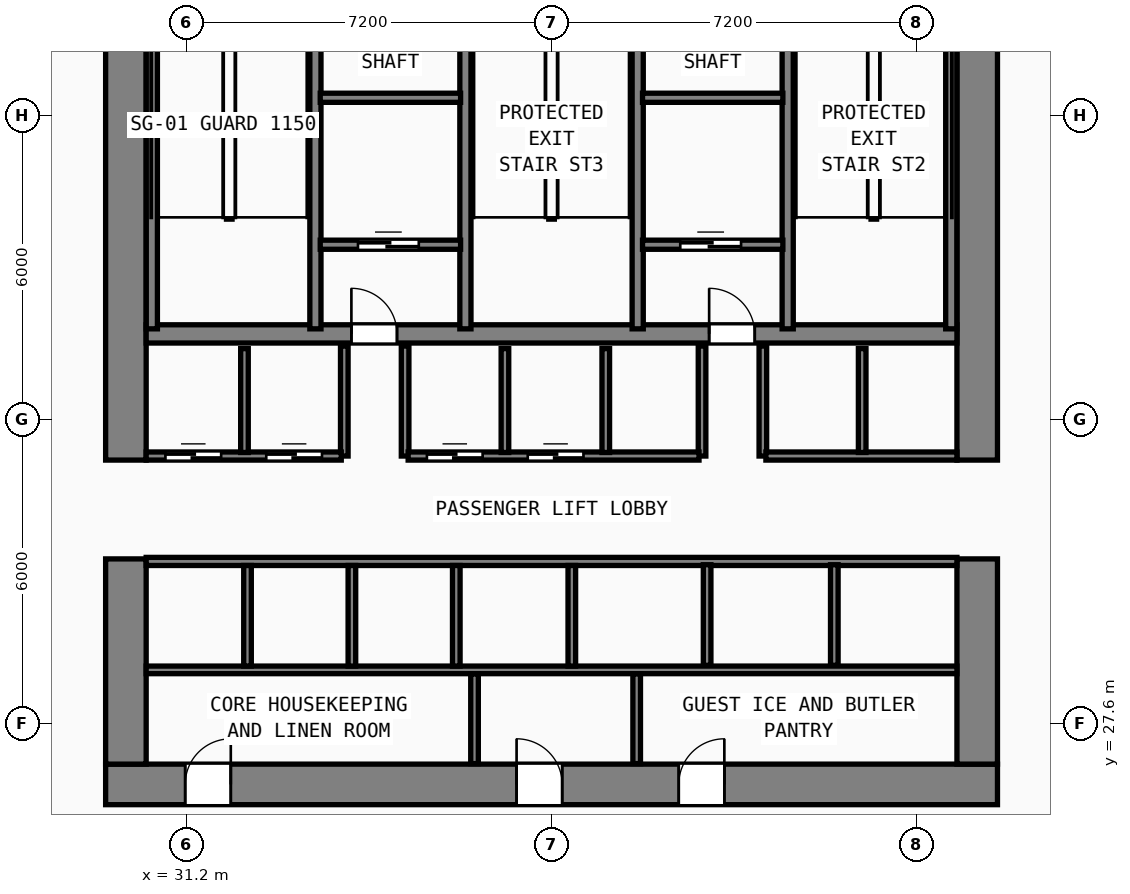
"""IFC4 building model, lengths in metres.
Left out: names, types, materials, properties, quantities, classifications, styles, units other than length and angle.
Written with IfcOpenShell. Run it as: python <this file> out.ifc"""

import sys

from ifc_helpers import new_model, si_unit, direction, frame, frame_2d, origin, place, context, subcontext, project, spatial, rectangle, extrude, element, fill, save


model = new_model("IFC4")
c1 = context("Model", 3, precision=1e-05, world=origin(), true_north=direction((0.0, 1.0)))
c2 = subcontext(c1, "Body", "Model", "MODEL_VIEW")
j1 = project(units=[si_unit("LENGTHUNIT", "METRE"), si_unit("PLANEANGLEUNIT", "RADIAN")], contexts=[c1])
p1 = place(None, origin())
s1 = spatial("IfcSite", under=j1, at=p1, CompositionType="ELEMENT")
p2 = place(p1, origin())
s2 = spatial("IfcBuilding", under=s1, at=p2, CompositionType="ELEMENT")
p3 = place(p2, frame((0.0, 0.0, 5.4)))
s3 = spatial("IfcBuildingStorey", under=s2, at=p3, CompositionType="ELEMENT", Elevation=5.4)
p4 = place(p3, frame((29.6, 26.4, 0.0), z_axis=(0.0, 0.0, 1.0), x_axis=(1.0, 0.0, 0.0)))
e1 = element("IfcWall", 1, at=p4, inside=s3, PredefinedType="SHEAR", context=c2, shape_type="SweptSolid", body=[
    extrude(rectangle(XDim=17.6, YDim=0.8, at=frame_2d((8.8, 0.0))), origin(), (0.0, 0.0, 1.0), 4.56),
])
p5 = place(p4, frame((2.47, 0.0, 0.0), z_axis=(0.0, 0.0, 1.0), x_axis=(-1.0, 0.0, 0.0)))
e2 = element("IfcOpeningElement", 2, at=p5, cuts=e1, PredefinedType="OPENING", context=c2, shape_type="SweptSolid", body=[
    extrude(rectangle(XDim=0.9, YDim=2.1, at=frame_2d((0.45, 1.05))), frame((0.0, 0.41, 0.0), z_axis=(0.0, -1.0, 0.0), x_axis=(1.0, 0.0, 0.0)), (0.0, 0.0, 1.0), 0.82),
])
p6 = place(p4, frame((9.01, 0.0, 0.0), z_axis=(0.0, 0.0, 1.0), x_axis=(-1.0, 0.0, 0.0)))
e3 = element("IfcOpeningElement", 3, at=p6, cuts=e1, PredefinedType="OPENING", context=c2, shape_type="SweptSolid", body=[
    extrude(rectangle(XDim=0.9, YDim=2.1, at=frame_2d((0.45, 1.05))), frame((0.0, 0.41, 0.0), z_axis=(0.0, -1.0, 0.0), x_axis=(1.0, 0.0, 0.0)), (0.0, 0.0, 1.0), 0.82),
])
p7 = place(p4, frame((12.21, 0.0, 0.0), z_axis=(0.0, 0.0, 1.0), x_axis=(-1.0, 0.0, 0.0)))
e4 = element("IfcOpeningElement", 4, at=p7, cuts=e1, PredefinedType="OPENING", context=c2, shape_type="SweptSolid", body=[
    extrude(rectangle(XDim=0.9, YDim=2.1, at=frame_2d((0.45, 1.05))), frame((0.0, 0.41, 0.0), z_axis=(0.0, -1.0, 0.0), x_axis=(1.0, 0.0, 0.0)), (0.0, 0.0, 1.0), 0.82),
])
p8 = place(p3, frame((30.0, 26.8, 0.0), z_axis=(0.0, 0.0, 1.0), x_axis=(0.0, 1.0, 0.0)))
e5 = element("IfcWall", 5, at=p8, inside=s3, PredefinedType="SHEAR", context=c2, shape_type="SweptSolid", body=[
    extrude(rectangle(XDim=4.05, YDim=0.8, at=frame_2d((2.025, 0.0))), origin(), (0.0, 0.0, 1.0), 4.56),
])
p9 = place(p3, frame((30.0, 32.8, 0.0), z_axis=(0.0, 0.0, 1.0), x_axis=(0.0, 1.0, 0.0)))
e6 = element("IfcWall", 6, at=p9, inside=s3, PredefinedType="SHEAR", context=c2, shape_type="SweptSolid", body=[
    extrude(rectangle(XDim=10.0, YDim=0.8, at=frame_2d((5.0, 0.0))), origin(), (0.0, 0.0, 1.0), 4.56),
])
p10 = place(p3, frame((46.8, 26.8, 0.0), z_axis=(0.0, 0.0, 1.0), x_axis=(0.0, 1.0, 0.0)))
e7 = element("IfcWall", 7, at=p10, inside=s3, PredefinedType="SHEAR", context=c2, shape_type="SweptSolid", body=[
    extrude(rectangle(XDim=4.05, YDim=0.8, at=frame_2d((2.025, 0.0))), origin(), (0.0, 0.0, 1.0), 4.56),
])
p11 = place(p3, frame((46.8, 32.8, 0.0), z_axis=(0.0, 0.0, 1.0), x_axis=(0.0, 1.0, 0.0)))
e8 = element("IfcWall", 8, at=p11, inside=s3, PredefinedType="SHEAR", context=c2, shape_type="SweptSolid", body=[
    extrude(rectangle(XDim=10.0, YDim=0.8, at=frame_2d((5.0, 0.0))), origin(), (0.0, 0.0, 1.0), 4.56),
])
p12 = place(p3, frame((30.4, 35.29, 0.0), z_axis=(0.0, 0.0, 1.0), x_axis=(1.0, 0.0, 0.0)))
e9 = element("IfcWall", 9, at=p12, inside=s3, PredefinedType="SHEAR", context=c2, shape_type="SweptSolid", body=[
    extrude(rectangle(XDim=16.0, YDim=0.36, at=frame_2d((8.0, 0.0))), origin(), (0.0, 0.0, 1.0), 4.56),
])
p13 = place(p12, frame((4.95, 0.0, 0.0), z_axis=(0.0, 0.0, 1.0), x_axis=(-1.0, 0.0, 0.0)))
e10 = element("IfcOpeningElement", 10, at=p13, cuts=e9, PredefinedType="OPENING", context=c2, shape_type="SweptSolid", body=[
    extrude(rectangle(XDim=0.9, YDim=2.1, at=frame_2d((0.45, 1.05))), frame((0.0, 0.19, 0.0), z_axis=(0.0, -1.0, 0.0), x_axis=(1.0, 0.0, 0.0)), (0.0, 0.0, 1.0), 0.38),
])
p14 = place(p12, frame((12.01, 0.0, 0.0), z_axis=(0.0, 0.0, 1.0), x_axis=(-1.0, 0.0, 0.0)))
e11 = element("IfcOpeningElement", 11, at=p14, cuts=e9, PredefinedType="OPENING", context=c2, shape_type="SweptSolid", body=[
    extrude(rectangle(XDim=0.9, YDim=2.1, at=frame_2d((0.45, 1.05))), frame((0.0, 0.19, 0.0), z_axis=(0.0, -1.0, 0.0), x_axis=(1.0, 0.0, 0.0)), (0.0, 0.0, 1.0), 0.38),
])
for number, where, z_axis, x_axis in (
    (12, (30.512, 35.39, 0.0), (0.0, 0.0, 1.0), (0.0, 1.0, 0.0)),
    (13, (33.74, 35.39, 0.0), (0.0, 0.0, 1.0), (0.0, 1.0, 0.0)),
    (14, (36.7, 35.39, 0.0), (0.0, 0.0, 1.0), (0.0, 1.0, 0.0)),
    (15, (40.1, 35.39, 0.0), (0.0, 0.0, 1.0), (0.0, 1.0, 0.0)),
    (16, (43.06, 35.39, 0.0), (0.0, 0.0, 1.0), (0.0, 1.0, 0.0)),
    (17, (46.288, 35.39, 0.0), (0.0, 0.0, 1.0), (0.0, 1.0, 0.0)),
):
    element("IfcWall", number, at=place(p3, frame(where, z_axis=z_axis, x_axis=x_axis)), inside=s3, PredefinedType="SHEAR", context=c2, shape_type="SweptSolid", body=[
        extrude(rectangle(XDim=7.41, YDim=0.22, at=frame_2d((3.705, 0.0))), origin(), (0.0, 0.0, 1.0), 4.56),
    ])
for number, where, z_axis, x_axis in (
    (18, (33.835, 39.95, 0.0), (0.0, 0.0, 1.0), (1.0, 0.0, 0.0)),
    (19, (40.195, 39.95, 0.0), (0.0, 0.0, 1.0), (1.0, 0.0, 0.0)),
):
    element("IfcWall", number, at=place(p3, frame(where, z_axis=z_axis, x_axis=x_axis)), inside=s3, PredefinedType="SOLIDWALL", context=c2, shape_type="SweptSolid", body=[
        extrude(rectangle(XDim=2.77, YDim=0.18, at=frame_2d((1.385, 0.0))), origin(), (0.0, 0.0, 1.0), 4.56),
    ])
p15 = place(p3, frame((33.835, 37.05, 0.0), z_axis=(0.0, 0.0, 1.0), x_axis=(1.0, 0.0, 0.0)))
e20 = element("IfcWall", 20, at=p15, inside=s3, PredefinedType="SOLIDWALL", context=c2, shape_type="SweptSolid", body=[
    extrude(rectangle(XDim=2.77, YDim=0.18, at=frame_2d((1.385, 0.0))), origin(), (0.0, 0.0, 1.0), 4.56),
])
p16 = place(p15, frame((1.945, 0.0, 0.0), z_axis=(0.0, 0.0, 1.0), x_axis=(-1.0, 0.0, 0.0)))
e21 = element("IfcOpeningElement", 21, at=p16, cuts=e20, PredefinedType="OPENING", context=c2, shape_type="SweptSolid", body=[
    extrude(rectangle(XDim=1.2, YDim=2.2, at=frame_2d((0.6, 1.1))), frame((0.0, 0.1, 0.0), z_axis=(0.0, -1.0, 0.0), x_axis=(1.0, 0.0, 0.0)), (0.0, 0.0, 1.0), 0.2),
])
for number, where, z_axis, x_axis in (
    (22, (34.31, 32.88, 0.0), (0.0, 0.0, 1.0), (0.0, 1.0, 0.0)),
    (23, (35.51, 32.88, 0.0), (0.0, 0.0, 1.0), (0.0, 1.0, 0.0)),
):
    element("IfcWall", number, at=place(p3, frame(where, z_axis=z_axis, x_axis=x_axis)), inside=s3, PredefinedType="SOLIDWALL", context=c2, shape_type="SweptSolid", body=[
        extrude(rectangle(XDim=2.17, YDim=0.15, at=frame_2d((1.085, 0.0))), origin(), (0.0, 0.0, 1.0), 4.56),
    ])
p17 = place(p3, frame((40.195, 37.05, 0.0), z_axis=(0.0, 0.0, 1.0), x_axis=(1.0, 0.0, 0.0)))
e24 = element("IfcWall", 24, at=p17, inside=s3, PredefinedType="SOLIDWALL", context=c2, shape_type="SweptSolid", body=[
    extrude(rectangle(XDim=2.77, YDim=0.18, at=frame_2d((1.385, 0.0))), origin(), (0.0, 0.0, 1.0), 4.56),
])
p18 = place(p17, frame((1.945, 0.0, 0.0), z_axis=(0.0, 0.0, 1.0), x_axis=(-1.0, 0.0, 0.0)))
e25 = element("IfcOpeningElement", 25, at=p18, cuts=e24, PredefinedType="OPENING", context=c2, shape_type="SweptSolid", body=[
    extrude(rectangle(XDim=1.2, YDim=2.2, at=frame_2d((0.6, 1.1))), frame((0.0, 0.1, 0.0), z_axis=(0.0, -1.0, 0.0), x_axis=(1.0, 0.0, 0.0)), (0.0, 0.0, 1.0), 0.2),
])
for number, where, z_axis, x_axis in (
    (26, (41.37, 32.88, 0.0), (0.0, 0.0, 1.0), (0.0, 1.0, 0.0)),
    (27, (42.57, 32.88, 0.0), (0.0, 0.0, 1.0), (0.0, 1.0, 0.0)),
):
    element("IfcWall", number, at=place(p3, frame(where, z_axis=z_axis, x_axis=x_axis)), inside=s3, PredefinedType="SOLIDWALL", context=c2, shape_type="SweptSolid", body=[
        extrude(rectangle(XDim=2.17, YDim=0.15, at=frame_2d((1.085, 0.0))), origin(), (0.0, 0.0, 1.0), 4.56),
    ])
p19 = place(p3, frame((30.4, 32.88, 0.0), z_axis=(0.0, 0.0, 1.0), x_axis=(1.0, 0.0, 0.0)))
e28 = element("IfcWall", 28, at=p19, inside=s3, PredefinedType="SOLIDWALL", context=c2, shape_type="SweptSolid", body=[
    extrude(rectangle(XDim=3.85, YDim=0.16, at=frame_2d((1.925, 0.0))), origin(), (0.0, 0.0, 1.0), 4.56),
])
p20 = place(p19, frame((1.48, 0.0, 0.0), z_axis=(0.0, 0.0, 1.0), x_axis=(-1.0, 0.0, 0.0)))
e29 = element("IfcOpeningElement", 29, at=p20, cuts=e28, PredefinedType="OPENING", context=c2, shape_type="SweptSolid", body=[
    extrude(rectangle(XDim=1.1, YDim=2.2, at=frame_2d((0.55, 1.1))), frame((0.0, 0.09, 0.0), z_axis=(0.0, -1.0, 0.0), x_axis=(1.0, 0.0, 0.0)), (0.0, 0.0, 1.0), 0.18),
])
p21 = place(p19, frame((3.47, 0.0, 0.0), z_axis=(0.0, 0.0, 1.0), x_axis=(-1.0, 0.0, 0.0)))
e30 = element("IfcOpeningElement", 30, at=p21, cuts=e28, PredefinedType="OPENING", context=c2, shape_type="SweptSolid", body=[
    extrude(rectangle(XDim=1.1, YDim=2.2, at=frame_2d((0.55, 1.1))), frame((0.0, 0.09, 0.0), z_axis=(0.0, -1.0, 0.0), x_axis=(1.0, 0.0, 0.0)), (0.0, 0.0, 1.0), 0.18),
])
p22 = place(p3, frame((35.57, 32.88, 0.0), z_axis=(0.0, 0.0, 1.0), x_axis=(1.0, 0.0, 0.0)))
e31 = element("IfcWall", 31, at=p22, inside=s3, PredefinedType="SOLIDWALL", context=c2, shape_type="SweptSolid", body=[
    extrude(rectangle(XDim=5.74, YDim=0.16, at=frame_2d((2.87, 0.0))), origin(), (0.0, 0.0, 1.0), 4.56),
])
p23 = place(p22, frame((1.47, 0.0, 0.0), z_axis=(0.0, 0.0, 1.0), x_axis=(-1.0, 0.0, 0.0)))
e32 = element("IfcOpeningElement", 32, at=p23, cuts=e31, PredefinedType="OPENING", context=c2, shape_type="SweptSolid", body=[
    extrude(rectangle(XDim=1.1, YDim=2.2, at=frame_2d((0.55, 1.1))), frame((0.0, 0.09, 0.0), z_axis=(0.0, -1.0, 0.0), x_axis=(1.0, 0.0, 0.0)), (0.0, 0.0, 1.0), 0.18),
])
p24 = place(p22, frame((3.46, 0.0, 0.0), z_axis=(0.0, 0.0, 1.0), x_axis=(-1.0, 0.0, 0.0)))
e33 = element("IfcOpeningElement", 33, at=p24, cuts=e31, PredefinedType="OPENING", context=c2, shape_type="SweptSolid", body=[
    extrude(rectangle(XDim=1.1, YDim=2.2, at=frame_2d((0.55, 1.1))), frame((0.0, 0.09, 0.0), z_axis=(0.0, -1.0, 0.0), x_axis=(1.0, 0.0, 0.0)), (0.0, 0.0, 1.0), 0.18),
])
p25 = place(p3, frame((42.63, 32.88, 0.0), z_axis=(0.0, 0.0, 1.0), x_axis=(1.0, 0.0, 0.0)))
e34 = element("IfcWall", 34, at=p25, inside=s3, PredefinedType="SOLIDWALL", context=c2, shape_type="SweptSolid", body=[
    extrude(rectangle(XDim=3.77, YDim=0.16, at=frame_2d((1.885, 0.0))), origin(), (0.0, 0.0, 1.0), 4.56),
])
for number, where, z_axis, x_axis in (
    (35, (32.34, 32.95, 0.0), (0.0, 0.0, 1.0), (0.0, 1.0, 0.0)),
    (36, (37.48, 32.95, 0.0), (0.0, 0.0, 1.0), (0.0, 1.0, 0.0)),
    (37, (39.47, 32.95, 0.0), (0.0, 0.0, 1.0), (0.0, 1.0, 0.0)),
    (38, (44.53, 32.95, 0.0), (0.0, 0.0, 1.0), (0.0, 1.0, 0.0)),
):
    element("IfcWall", number, at=place(p3, frame(where, z_axis=z_axis, x_axis=x_axis)), inside=s3, PredefinedType="SOLIDWALL", context=c2, shape_type="SweptSolid", body=[
        extrude(rectangle(XDim=2.05, YDim=0.15, at=frame_2d((1.025, 0.0))), origin(), (0.0, 0.0, 1.0), 4.56),
    ])
p26 = place(p3, frame((30.4, 30.8, 0.0), z_axis=(0.0, 0.0, 1.0), x_axis=(1.0, 0.0, 0.0)))
e39 = element("IfcWall", 39, at=p26, inside=s3, PredefinedType="SOLIDWALL", context=c2, shape_type="SweptSolid", body=[
    extrude(rectangle(XDim=16.0, YDim=0.16, at=frame_2d((8.0, 0.0))), origin(), (0.0, 0.0, 1.0), 4.56),
])
p27 = place(p3, frame((30.4, 28.66, 0.0), z_axis=(0.0, 0.0, 1.0), x_axis=(1.0, 0.0, 0.0)))
e40 = element("IfcWall", 40, at=p27, inside=s3, PredefinedType="PARTITIONING", context=c2, shape_type="SweptSolid", body=[
    extrude(rectangle(XDim=16.0, YDim=0.15, at=frame_2d((8.0, 0.0))), origin(), (0.0, 0.0, 1.0), 4.56),
])
for number, where, z_axis, x_axis in (
    (41, (32.4, 28.735, 0.0), (0.0, 0.0, 1.0), (0.0, 1.0, 0.0)),
    (42, (34.46, 28.735, 0.0), (0.0, 0.0, 1.0), (0.0, 1.0, 0.0)),
    (43, (36.52, 28.735, 0.0), (0.0, 0.0, 1.0), (0.0, 1.0, 0.0)),
    (44, (38.8, 28.735, 0.0), (0.0, 0.0, 1.0), (0.0, 1.0, 0.0)),
):
    element("IfcWall", number, at=place(p3, frame(where, z_axis=z_axis, x_axis=x_axis)), inside=s3, PredefinedType="SOLIDWALL", context=c2, shape_type="SweptSolid", body=[
        extrude(rectangle(XDim=1.985, YDim=0.15, at=frame_2d((0.992, 0.0))), origin(), (0.0, 0.0, 1.0), 4.56),
    ])
for number, where, z_axis, x_axis in (
    (45, (36.88, 26.81, 0.0), (0.0, 0.0, 1.0), (0.0, 1.0, 0.0)),
    (46, (40.08, 26.81, 0.0), (0.0, 0.0, 1.0), (0.0, 1.0, 0.0)),
):
    element("IfcWall", number, at=place(p3, frame(where, z_axis=z_axis, x_axis=x_axis)), inside=s3, PredefinedType="PARTITIONING", context=c2, shape_type="SweptSolid", body=[
        extrude(rectangle(XDim=1.77, YDim=0.15, at=frame_2d((0.885, 0.0))), origin(), (0.0, 0.0, 1.0), 4.56),
    ])
for number, where, z_axis, x_axis in (
    (47, (41.47, 28.75, 0.0), (0.0, 0.0, 1.0), (0.0, 1.0, 0.0)),
    (48, (43.98, 28.75, 0.0), (0.0, 0.0, 1.0), (0.0, 1.0, 0.0)),
):
    element("IfcWall", number, at=place(p3, frame(where, z_axis=z_axis, x_axis=x_axis)), inside=s3, PredefinedType="SOLIDWALL", context=c2, shape_type="SweptSolid", body=[
        extrude(rectangle(XDim=1.985, YDim=0.15, at=frame_2d((0.993, 0.0))), origin(), (0.0, 0.0, 1.0), 4.56),
    ])
p28 = place(p16, origin())
e49 = element("IfcDoor", 49, at=p28, inside=s3, OperationType="SLIDING_TO_RIGHT", PredefinedType="DOOR", context=c2, shape_type="SweptSolid", body=[
    extrude(rectangle(XDim=1.2, YDim=2.2, at=frame_2d((0.6, 1.1))), frame((0.0, 0.025, 0.0), z_axis=(0.0, -1.0, 0.0), x_axis=(1.0, 0.0, 0.0)), (0.0, 0.0, 1.0), 0.05),
])
fill(e21, e49)
p29 = place(p13, origin())
e50 = element("IfcDoor", 50, at=p29, inside=s3, OperationType="SINGLE_SWING_RIGHT", PredefinedType="DOOR", context=c2, shape_type="SweptSolid", body=[
    extrude(rectangle(XDim=0.9, YDim=2.1, at=frame_2d((0.45, 1.05))), frame((0.0, 0.025, 0.0), z_axis=(0.0, -1.0, 0.0), x_axis=(1.0, 0.0, 0.0)), (0.0, 0.0, 1.0), 0.05),
])
fill(e10, e50)
p30 = place(p18, origin())
e51 = element("IfcDoor", 51, at=p30, inside=s3, OperationType="SLIDING_TO_RIGHT", PredefinedType="DOOR", context=c2, shape_type="SweptSolid", body=[
    extrude(rectangle(XDim=1.2, YDim=2.2, at=frame_2d((0.6, 1.1))), frame((0.0, 0.025, 0.0), z_axis=(0.0, -1.0, 0.0), x_axis=(1.0, 0.0, 0.0)), (0.0, 0.0, 1.0), 0.05),
])
fill(e25, e51)
p31 = place(p14, origin())
e52 = element("IfcDoor", 52, at=p31, inside=s3, OperationType="SINGLE_SWING_RIGHT", PredefinedType="DOOR", context=c2, shape_type="SweptSolid", body=[
    extrude(rectangle(XDim=0.9, YDim=2.1, at=frame_2d((0.45, 1.05))), frame((0.0, 0.025, 0.0), z_axis=(0.0, -1.0, 0.0), x_axis=(1.0, 0.0, 0.0)), (0.0, 0.0, 1.0), 0.05),
])
fill(e11, e52)
p32 = place(p20, origin())
e53 = element("IfcDoor", 53, at=p32, inside=s3, OperationType="SLIDING_TO_LEFT", PredefinedType="DOOR", context=c2, shape_type="SweptSolid", body=[
    extrude(rectangle(XDim=1.1, YDim=2.2, at=frame_2d((0.55, 1.1))), frame((0.0, 0.025, 0.0), z_axis=(0.0, -1.0, 0.0), x_axis=(1.0, 0.0, 0.0)), (0.0, 0.0, 1.0), 0.05),
])
fill(e29, e53)
p33 = place(p21, origin())
e54 = element("IfcDoor", 54, at=p33, inside=s3, OperationType="SLIDING_TO_LEFT", PredefinedType="DOOR", context=c2, shape_type="SweptSolid", body=[
    extrude(rectangle(XDim=1.1, YDim=2.2, at=frame_2d((0.55, 1.1))), frame((0.0, 0.025, 0.0), z_axis=(0.0, -1.0, 0.0), x_axis=(1.0, 0.0, 0.0)), (0.0, 0.0, 1.0), 0.05),
])
fill(e30, e54)
p34 = place(p23, origin())
e55 = element("IfcDoor", 55, at=p34, inside=s3, OperationType="SLIDING_TO_LEFT", PredefinedType="DOOR", context=c2, shape_type="SweptSolid", body=[
    extrude(rectangle(XDim=1.1, YDim=2.2, at=frame_2d((0.55, 1.1))), frame((0.0, 0.025, 0.0), z_axis=(0.0, -1.0, 0.0), x_axis=(1.0, 0.0, 0.0)), (0.0, 0.0, 1.0), 0.05),
])
fill(e32, e55)
p35 = place(p24, origin())
e56 = element("IfcDoor", 56, at=p35, inside=s3, OperationType="SLIDING_TO_LEFT", PredefinedType="DOOR", context=c2, shape_type="SweptSolid", body=[
    extrude(rectangle(XDim=1.1, YDim=2.2, at=frame_2d((0.55, 1.1))), frame((0.0, 0.025, 0.0), z_axis=(0.0, -1.0, 0.0), x_axis=(1.0, 0.0, 0.0)), (0.0, 0.0, 1.0), 0.05),
])
fill(e33, e56)
p36 = place(p5, origin())
e57 = element("IfcDoor", 57, at=p36, inside=s3, OperationType="SINGLE_SWING_LEFT", PredefinedType="DOOR", context=c2, shape_type="SweptSolid", body=[
    extrude(rectangle(XDim=0.9, YDim=2.1, at=frame_2d((0.45, 1.05))), frame((0.0, -0.195, 0.0), z_axis=(0.0, -1.0, 0.0), x_axis=(1.0, 0.0, 0.0)), (0.0, 0.0, 1.0), 0.05),
])
fill(e2, e57)
p37 = place(p6, origin())
e58 = element("IfcDoor", 58, at=p37, inside=s3, OperationType="SINGLE_SWING_RIGHT", PredefinedType="DOOR", context=c2, shape_type="SweptSolid", body=[
    extrude(rectangle(XDim=0.9, YDim=2.1, at=frame_2d((0.45, 1.05))), frame((0.0, -0.195, 0.0), z_axis=(0.0, -1.0, 0.0), x_axis=(1.0, 0.0, 0.0)), (0.0, 0.0, 1.0), 0.05),
])
fill(e3, e58)
p38 = place(p7, origin())
e59 = element("IfcDoor", 59, at=p38, inside=s3, OperationType="SINGLE_SWING_LEFT", PredefinedType="DOOR", context=c2, shape_type="SweptSolid", body=[
    extrude(rectangle(XDim=0.9, YDim=2.1, at=frame_2d((0.45, 1.05))), frame((0.0, -0.195, 0.0), z_axis=(0.0, -1.0, 0.0), x_axis=(1.0, 0.0, 0.0)), (0.0, 0.0, 1.0), 0.05),
])
fill(e4, e59)
save(model, sys.argv[1])
